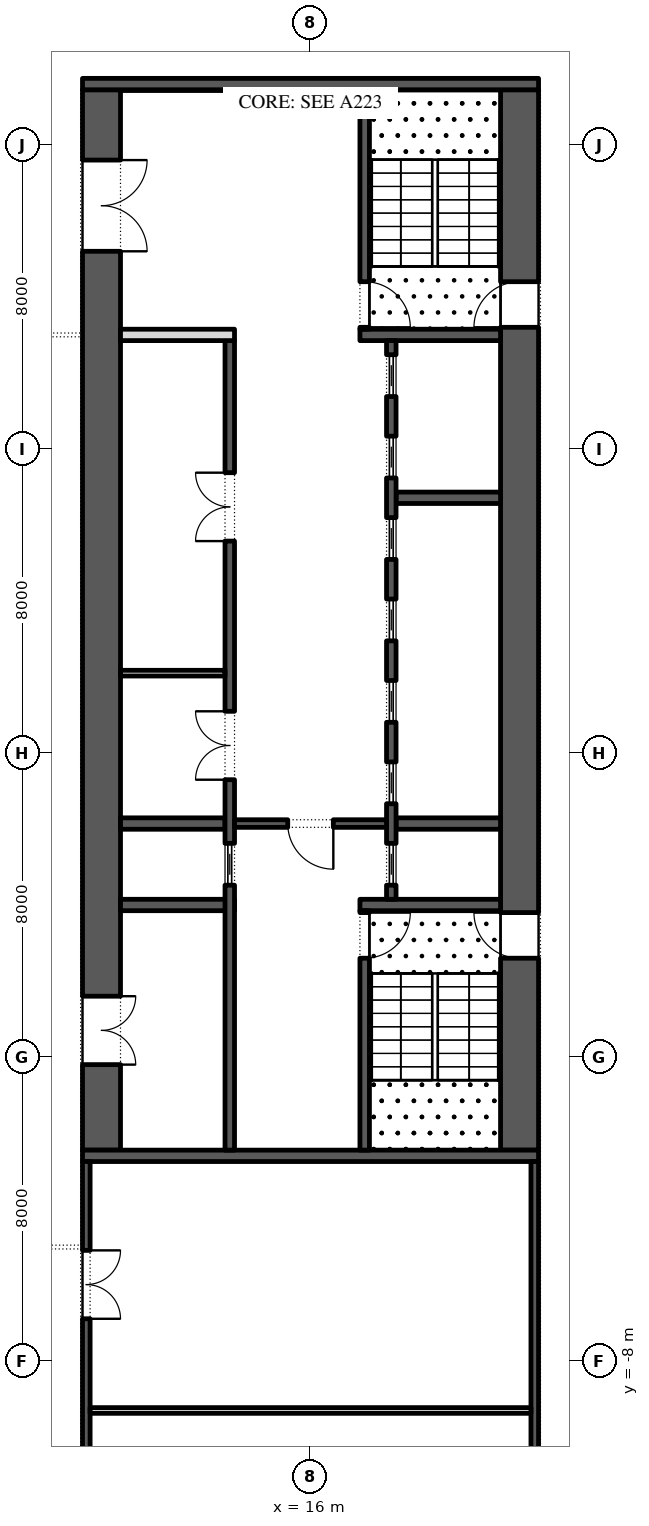
"""IFC4 building model, lengths in metres.
Left out: names, types, materials, properties, quantities, classifications, styles, units other than length and angle.
Written with IfcOpenShell. Run it as: python <this file> out.ifc"""

import sys

from ifc_helpers import new_model, si_unit, direction, frame, frame_2d, origin, place, context, subcontext, project, spatial, rectangle, extrude, element, fill, save


model = new_model("IFC4")
c1 = context("Model", 3, precision=1e-05, world=origin(), true_north=direction((0.0, 1.0)))
c2 = subcontext(c1, "Body", "Model", "MODEL_VIEW")
j1 = project(units=[si_unit("LENGTHUNIT", "METRE"), si_unit("PLANEANGLEUNIT", "RADIAN")], contexts=[c1])
p1 = place(None, origin())
s1 = spatial("IfcSite", under=j1, at=p1, CompositionType="ELEMENT")
p2 = place(p1, origin())
s2 = spatial("IfcBuilding", under=s1, at=p2, CompositionType="ELEMENT")
p3 = place(p2, frame((0.0, 0.0, 94.2)))
s3 = spatial("IfcBuildingStorey", under=s2, at=p3, CompositionType="ELEMENT", Elevation=94.2)
p4 = place(p3, frame((21.5, -2.45, 0.0), z_axis=(0.0, 0.0, 1.0), x_axis=(0.0, 1.0, 0.0)))
e1 = element("IfcWall", 1, at=p4, inside=s3, PredefinedType="SHEAR", context=c2, shape_type="SweptSolid", body=[
    extrude(rectangle(XDim=27.9, YDim=1.0, at=frame_2d((13.95, 0.0))), origin(), (0.0, 0.0, 1.0), 4.95),
])
p5 = place(p4, frame((5.05, 0.0, 0.0)))
e2 = element("IfcOpeningElement", 2, at=p5, cuts=e1, PredefinedType="OPENING", context=c2, shape_type="SweptSolid", body=[
    extrude(rectangle(XDim=1.2, YDim=2.1, at=frame_2d((0.6, 1.05))), frame((0.0, 0.51, 0.0), z_axis=(0.0, -1.0, 0.0), x_axis=(1.0, 0.0, 0.0)), (0.0, 0.0, 1.0), 1.02),
])
p6 = place(p4, frame((21.65, 0.0, 0.0)))
e3 = element("IfcOpeningElement", 3, at=p6, cuts=e1, PredefinedType="OPENING", context=c2, shape_type="SweptSolid", body=[
    extrude(rectangle(XDim=1.2, YDim=2.1, at=frame_2d((0.6, 1.05))), frame((0.0, 0.51, 0.0), z_axis=(0.0, -1.0, 0.0), x_axis=(1.0, 0.0, 0.0)), (0.0, 0.0, 1.0), 1.02),
])
p7 = place(p3, frame((10.5, -2.45, 0.0), z_axis=(0.0, 0.0, 1.0), x_axis=(0.0, 1.0, 0.0)))
e4 = element("IfcWall", 4, at=p7, inside=s3, PredefinedType="SHEAR", context=c2, shape_type="SweptSolid", body=[
    extrude(rectangle(XDim=27.9, YDim=1.0, at=frame_2d((13.95, 0.0))), origin(), (0.0, 0.0, 1.0), 4.95),
])
p8 = place(p7, frame((23.65, 0.0, 0.0)))
e5 = element("IfcOpeningElement", 5, at=p8, cuts=e4, PredefinedType="OPENING", context=c2, shape_type="SweptSolid", body=[
    extrude(rectangle(XDim=2.4, YDim=2.1, at=frame_2d((1.2, 1.05))), frame((0.0, 0.51, 0.0), z_axis=(0.0, -1.0, 0.0), x_axis=(1.0, 0.0, 0.0)), (0.0, 0.0, 1.0), 1.02),
])
p9 = place(p7, frame((2.25, 0.0, 0.0)))
e6 = element("IfcOpeningElement", 6, at=p9, cuts=e4, PredefinedType="OPENING", context=c2, shape_type="SweptSolid", body=[
    extrude(rectangle(XDim=1.8, YDim=2.4, at=frame_2d((0.9, 1.2))), frame((0.0, 0.51, 0.0), z_axis=(0.0, -1.0, 0.0), x_axis=(1.0, 0.0, 0.0)), (0.0, 0.0, 1.0), 1.02),
])
for number, where, z_axis, x_axis in (
    (7, (10.0, -2.6, 0.0), (0.0, 0.0, 1.0), (1.0, 0.0, 0.0)),
    (8, (10.0, 25.6, 0.0), (0.0, 0.0, 1.0), (1.0, 0.0, 0.0)),
):
    element("IfcWall", number, at=place(p3, frame(where, z_axis=z_axis, x_axis=x_axis)), inside=s3, PredefinedType="SHEAR", context=c2, shape_type="SweptSolid", body=[
        extrude(rectangle(XDim=12.0, YDim=0.3, at=frame_2d((6.0, 0.0))), origin(), (0.0, 0.0, 1.0), 4.95),
    ])
p10 = place(p3, frame((17.3, 4.0, 0.0), z_axis=(0.0, 0.0, 1.0), x_axis=(1.0, 0.0, 0.0)))
e9 = element("IfcWall", 9, at=p10, inside=s3, PredefinedType="SHEAR", context=c2, shape_type="SweptSolid", body=[
    extrude(rectangle(XDim=3.7, YDim=0.3, at=frame_2d((1.85, 0.0))), origin(), (0.0, 0.0, 1.0), 4.95),
])
p11 = place(p3, frame((17.425, -2.45, 0.0), z_axis=(0.0, 0.0, 1.0), x_axis=(0.0, 1.0, 0.0)))
e10 = element("IfcWall", 10, at=p11, inside=s3, PredefinedType="SHEAR", context=c2, shape_type="SweptSolid", body=[
    extrude(rectangle(XDim=6.3, YDim=0.25, at=frame_2d((3.15, 0.0))), origin(), (0.0, 0.0, 1.0), 4.95),
])
p12 = place(p11, frame((5.05, 0.0, 0.0)))
e11 = element("IfcOpeningElement", 11, at=p12, cuts=e10, PredefinedType="OPENING", context=c2, shape_type="SweptSolid", body=[
    extrude(rectangle(XDim=1.2, YDim=2.1, at=frame_2d((0.6, 1.05))), frame((0.0, 0.135, 0.0), z_axis=(0.0, -1.0, 0.0), x_axis=(1.0, 0.0, 0.0)), (0.0, 0.0, 1.0), 0.27),
])
p13 = place(p3, frame((17.3, 19.0, 0.0), z_axis=(0.0, 0.0, 1.0), x_axis=(1.0, 0.0, 0.0)))
e12 = element("IfcWall", 12, at=p13, inside=s3, PredefinedType="SHEAR", context=c2, shape_type="SweptSolid", body=[
    extrude(rectangle(XDim=3.7, YDim=0.3, at=frame_2d((1.85, 0.0))), origin(), (0.0, 0.0, 1.0), 4.95),
])
p14 = place(p3, frame((17.425, 19.15, 0.0), z_axis=(0.0, 0.0, 1.0), x_axis=(0.0, 1.0, 0.0)))
e13 = element("IfcWall", 13, at=p14, inside=s3, PredefinedType="SHEAR", context=c2, shape_type="SweptSolid", body=[
    extrude(rectangle(XDim=6.3, YDim=0.25, at=frame_2d((3.15, 0.0))), origin(), (0.0, 0.0, 1.0), 4.95),
])
p15 = place(p14, frame((0.05, 0.0, 0.0)))
e14 = element("IfcOpeningElement", 14, at=p15, cuts=e13, PredefinedType="OPENING", context=c2, shape_type="SweptSolid", body=[
    extrude(rectangle(XDim=1.2, YDim=2.1, at=frame_2d((0.6, 1.05))), frame((0.0, 0.135, 0.0), z_axis=(0.0, -1.0, 0.0), x_axis=(1.0, 0.0, 0.0)), (0.0, 0.0, 1.0), 0.27),
])
for number, where, z_axis, x_axis in (
    (15, (18.25, 6.143, 0.0), (0.0, 0.0, 1.0), (1.0, 0.0, 0.0)),
    (16, (18.25, 14.714, 0.0), (0.0, 0.0, 1.0), (1.0, 0.0, 0.0)),
):
    element("IfcWall", number, at=place(p3, frame(where, z_axis=z_axis, x_axis=x_axis)), inside=s3, PredefinedType="SHEAR", context=c2, shape_type="SweptSolid", body=[
        extrude(rectangle(XDim=2.75, YDim=0.3, at=frame_2d((1.375, 0.0))), origin(), (0.0, 0.0, 1.0), 4.95),
    ])
p16 = place(p3, frame((18.125, 4.15, 0.0), z_axis=(0.0, 0.0, 1.0), x_axis=(0.0, 1.0, 0.0)))
e17 = element("IfcWall", 17, at=p16, inside=s3, PredefinedType="SHEAR", context=c2, shape_type="SweptSolid", body=[
    extrude(rectangle(XDim=14.7, YDim=0.25, at=frame_2d((7.35, 0.0))), origin(), (0.0, 0.0, 1.0), 4.95),
])
p17 = place(p16, frame((0.371, 0.0, 0.0)))
e18 = element("IfcOpeningElement", 18, at=p17, cuts=e17, PredefinedType="OPENING", context=c2, shape_type="SweptSolid", body=[
    extrude(rectangle(XDim=1.1, YDim=2.1, at=frame_2d((0.55, 1.05))), frame((0.0, 0.135, 0.0), z_axis=(0.0, -1.0, 0.0), x_axis=(1.0, 0.0, 0.0)), (0.0, 0.0, 1.0), 0.27),
])
p18 = place(p16, frame((2.514, 0.0, 0.0)))
e19 = element("IfcOpeningElement", 19, at=p18, cuts=e17, PredefinedType="OPENING", context=c2, shape_type="SweptSolid", body=[
    extrude(rectangle(XDim=1.1, YDim=2.1, at=frame_2d((0.55, 1.05))), frame((0.0, 0.135, 0.0), z_axis=(0.0, -1.0, 0.0), x_axis=(1.0, 0.0, 0.0)), (0.0, 0.0, 1.0), 0.27),
])
p19 = place(p16, frame((4.657, 0.0, 0.0)))
e20 = element("IfcOpeningElement", 20, at=p19, cuts=e17, PredefinedType="OPENING", context=c2, shape_type="SweptSolid", body=[
    extrude(rectangle(XDim=1.1, YDim=2.1, at=frame_2d((0.55, 1.05))), frame((0.0, 0.135, 0.0), z_axis=(0.0, -1.0, 0.0), x_axis=(1.0, 0.0, 0.0)), (0.0, 0.0, 1.0), 0.27),
])
p20 = place(p16, frame((6.8, 0.0, 0.0)))
e21 = element("IfcOpeningElement", 21, at=p20, cuts=e17, PredefinedType="OPENING", context=c2, shape_type="SweptSolid", body=[
    extrude(rectangle(XDim=1.1, YDim=2.1, at=frame_2d((0.55, 1.05))), frame((0.0, 0.135, 0.0), z_axis=(0.0, -1.0, 0.0), x_axis=(1.0, 0.0, 0.0)), (0.0, 0.0, 1.0), 0.27),
])
p21 = place(p16, frame((8.943, 0.0, 0.0)))
e22 = element("IfcOpeningElement", 22, at=p21, cuts=e17, PredefinedType="OPENING", context=c2, shape_type="SweptSolid", body=[
    extrude(rectangle(XDim=1.1, YDim=2.1, at=frame_2d((0.55, 1.05))), frame((0.0, 0.135, 0.0), z_axis=(0.0, -1.0, 0.0), x_axis=(1.0, 0.0, 0.0)), (0.0, 0.0, 1.0), 0.27),
])
p22 = place(p16, frame((11.086, 0.0, 0.0)))
e23 = element("IfcOpeningElement", 23, at=p22, cuts=e17, PredefinedType="OPENING", context=c2, shape_type="SweptSolid", body=[
    extrude(rectangle(XDim=1.1, YDim=2.1, at=frame_2d((0.55, 1.05))), frame((0.0, 0.135, 0.0), z_axis=(0.0, -1.0, 0.0), x_axis=(1.0, 0.0, 0.0)), (0.0, 0.0, 1.0), 0.27),
])
p23 = place(p16, frame((13.229, 0.0, 0.0)))
e24 = element("IfcOpeningElement", 24, at=p23, cuts=e17, PredefinedType="OPENING", context=c2, shape_type="SweptSolid", body=[
    extrude(rectangle(XDim=1.1, YDim=2.1, at=frame_2d((0.55, 1.05))), frame((0.0, 0.135, 0.0), z_axis=(0.0, -1.0, 0.0), x_axis=(1.0, 0.0, 0.0)), (0.0, 0.0, 1.0), 0.27),
])
p24 = place(p3, frame((11.0, 4.0, 0.0), z_axis=(0.0, 0.0, 1.0), x_axis=(1.0, 0.0, 0.0)))
e25 = element("IfcWall", 25, at=p24, inside=s3, PredefinedType="SHEAR", context=c2, shape_type="SweptSolid", body=[
    extrude(rectangle(XDim=3.0, YDim=0.3, at=frame_2d((1.5, 0.0))), origin(), (0.0, 0.0, 1.0), 4.95),
])
p25 = place(p3, frame((11.0, 6.143, 0.0), z_axis=(0.0, 0.0, 1.0), x_axis=(1.0, 0.0, 0.0)))
e26 = element("IfcWall", 26, at=p25, inside=s3, PredefinedType="SHEAR", context=c2, shape_type="SweptSolid", body=[
    extrude(rectangle(XDim=2.75, YDim=0.3, at=frame_2d((1.375, 0.0))), origin(), (0.0, 0.0, 1.0), 4.95),
])
p26 = place(p3, frame((13.875, -2.45, 0.0), z_axis=(0.0, 0.0, 1.0), x_axis=(0.0, 1.0, 0.0)))
e27 = element("IfcWall", 27, at=p26, inside=s3, PredefinedType="SHEAR", context=c2, shape_type="SweptSolid", body=[
    extrude(rectangle(XDim=21.3, YDim=0.25, at=frame_2d((10.65, 0.0))), origin(), (0.0, 0.0, 1.0), 4.95),
])
p27 = place(p26, frame((9.746, 0.0, 0.0)))
e28 = element("IfcOpeningElement", 28, at=p27, cuts=e27, PredefinedType="OPENING", context=c2, shape_type="SweptSolid", body=[
    extrude(rectangle(XDim=1.8, YDim=2.4, at=frame_2d((0.9, 1.2))), frame((0.0, 0.135, 0.0), z_axis=(0.0, -1.0, 0.0), x_axis=(1.0, 0.0, 0.0)), (0.0, 0.0, 1.0), 0.27),
])
p28 = place(p26, frame((16.025, 0.0, 0.0)))
e29 = element("IfcOpeningElement", 29, at=p28, cuts=e27, PredefinedType="OPENING", context=c2, shape_type="SweptSolid", body=[
    extrude(rectangle(XDim=1.8, YDim=2.4, at=frame_2d((0.9, 1.2))), frame((0.0, 0.135, 0.0), z_axis=(0.0, -1.0, 0.0), x_axis=(1.0, 0.0, 0.0)), (0.0, 0.0, 1.0), 0.27),
])
p29 = place(p26, frame((6.971, 0.0, 0.0)))
e30 = element("IfcOpeningElement", 30, at=p29, cuts=e27, PredefinedType="OPENING", context=c2, shape_type="SweptSolid", body=[
    extrude(rectangle(XDim=1.1, YDim=2.1, at=frame_2d((0.55, 1.05))), frame((0.0, 0.135, 0.0), z_axis=(0.0, -1.0, 0.0), x_axis=(1.0, 0.0, 0.0)), (0.0, 0.0, 1.0), 0.27),
])
p30 = place(p3, frame((11.0, 19.0, 0.0), z_axis=(0.0, 0.0, 1.0), x_axis=(1.0, 0.0, 0.0)))
e31 = element("IfcWall", 31, at=p30, inside=s3, PredefinedType="PARTITIONING", context=c2, shape_type="SweptSolid", body=[
    extrude(rectangle(XDim=3.0, YDim=0.3, at=frame_2d((1.5, 0.0))), origin(), (0.0, 0.0, 1.0), 4.95),
])
p31 = place(p3, frame((11.0, 10.1, 0.0), z_axis=(0.0, 0.0, 1.0), x_axis=(1.0, 0.0, 0.0)))
e32 = element("IfcWall", 32, at=p31, inside=s3, PredefinedType="PARTITIONING", context=c2, shape_type="SweptSolid", body=[
    extrude(rectangle(XDim=2.75, YDim=0.15, at=frame_2d((1.375, 0.0))), origin(), (0.0, 0.0, 1.0), 4.95),
])
p32 = place(p3, frame((14.0, 6.143, 0.0), z_axis=(0.0, 0.0, 1.0), x_axis=(1.0, 0.0, 0.0)))
e33 = element("IfcWall", 33, at=p32, inside=s3, PredefinedType="SHEAR", context=c2, shape_type="SweptSolid", body=[
    extrude(rectangle(XDim=4.0, YDim=0.2, at=frame_2d((2.0, 0.0))), origin(), (0.0, 0.0, 1.0), 4.95),
])
p33 = place(p32, frame((1.4, 0.0, 0.0)))
e34 = element("IfcOpeningElement", 34, at=p33, cuts=e33, PredefinedType="OPENING", context=c2, shape_type="SweptSolid", body=[
    extrude(rectangle(XDim=1.2, YDim=2.1, at=frame_2d((0.6, 1.05))), frame((0.0, 0.11, 0.0), z_axis=(0.0, -1.0, 0.0), x_axis=(1.0, 0.0, 0.0)), (0.0, 0.0, 1.0), 0.22),
])
p34 = place(p3, frame((21.9, -15.8, 0.0), z_axis=(0.0, 0.0, 1.0), x_axis=(0.0, 1.0, 0.0)))
e35 = element("IfcWall", 35, at=p34, inside=s3, PredefinedType="SHEAR", context=c2, shape_type="SweptSolid", body=[
    extrude(rectangle(XDim=13.05, YDim=0.2, at=frame_2d((6.525, 0.0))), origin(), (0.0, 0.0, 1.0), 4.95),
])
p35 = place(p3, frame((10.1, -15.8, 0.0), z_axis=(0.0, 0.0, 1.0), x_axis=(0.0, 1.0, 0.0)))
e36 = element("IfcWall", 36, at=p35, inside=s3, PredefinedType="SHEAR", context=c2, shape_type="SweptSolid", body=[
    extrude(rectangle(XDim=13.05, YDim=0.2, at=frame_2d((6.525, 0.0))), origin(), (0.0, 0.0, 1.0), 4.95),
])
p36 = place(p35, frame((2.312, 0.0, 0.0)))
e37 = element("IfcOpeningElement", 37, at=p36, cuts=e36, PredefinedType="OPENING", context=c2, shape_type="SweptSolid", body=[
    extrude(rectangle(XDim=1.8, YDim=2.4, at=frame_2d((0.9, 1.2))), frame((0.0, 0.11, 0.0), z_axis=(0.0, -1.0, 0.0), x_axis=(1.0, 0.0, 0.0)), (0.0, 0.0, 1.0), 0.22),
])
p37 = place(p35, frame((8.913, 0.0, 0.0)))
e38 = element("IfcOpeningElement", 38, at=p37, cuts=e36, PredefinedType="OPENING", context=c2, shape_type="SweptSolid", body=[
    extrude(rectangle(XDim=1.8, YDim=2.4, at=frame_2d((0.9, 1.2))), frame((0.0, 0.11, 0.0), z_axis=(0.0, -1.0, 0.0), x_axis=(1.0, 0.0, 0.0)), (0.0, 0.0, 1.0), 0.22),
])
p38 = place(p3, frame((10.2, -9.3, 0.0), z_axis=(0.0, 0.0, 1.0), x_axis=(1.0, 0.0, 0.0)))
e39 = element("IfcWall", 39, at=p38, inside=s3, PredefinedType="PARTITIONING", context=c2, shape_type="SweptSolid", body=[
    extrude(rectangle(XDim=11.6, YDim=0.15, at=frame_2d((5.8, 0.0))), origin(), (0.0, 0.0, 1.0), 4.95),
])
p39 = place(p17, origin())
e40 = element("IfcDoor", 40, at=p39, inside=s3, OperationType="SLIDING_TO_LEFT", PredefinedType="DOOR", context=c2, shape_type="SweptSolid", body=[
    extrude(rectangle(XDim=1.1, YDim=2.1, at=frame_2d((0.55, 1.05))), frame((0.0, 0.025, 0.0), z_axis=(0.0, -1.0, 0.0), x_axis=(1.0, 0.0, 0.0)), (0.0, 0.0, 1.0), 0.05),
])
fill(e18, e40)
p40 = place(p18, origin())
e41 = element("IfcDoor", 41, at=p40, inside=s3, OperationType="SLIDING_TO_LEFT", PredefinedType="DOOR", context=c2, shape_type="SweptSolid", body=[
    extrude(rectangle(XDim=1.1, YDim=2.1, at=frame_2d((0.55, 1.05))), frame((0.0, 0.025, 0.0), z_axis=(0.0, -1.0, 0.0), x_axis=(1.0, 0.0, 0.0)), (0.0, 0.0, 1.0), 0.05),
])
fill(e19, e41)
p41 = place(p19, origin())
e42 = element("IfcDoor", 42, at=p41, inside=s3, OperationType="SLIDING_TO_LEFT", PredefinedType="DOOR", context=c2, shape_type="SweptSolid", body=[
    extrude(rectangle(XDim=1.1, YDim=2.1, at=frame_2d((0.55, 1.05))), frame((0.0, 0.025, 0.0), z_axis=(0.0, -1.0, 0.0), x_axis=(1.0, 0.0, 0.0)), (0.0, 0.0, 1.0), 0.05),
])
fill(e20, e42)
p42 = place(p20, origin())
e43 = element("IfcDoor", 43, at=p42, inside=s3, OperationType="SLIDING_TO_LEFT", PredefinedType="DOOR", context=c2, shape_type="SweptSolid", body=[
    extrude(rectangle(XDim=1.1, YDim=2.1, at=frame_2d((0.55, 1.05))), frame((0.0, 0.025, 0.0), z_axis=(0.0, -1.0, 0.0), x_axis=(1.0, 0.0, 0.0)), (0.0, 0.0, 1.0), 0.05),
])
fill(e21, e43)
p43 = place(p21, origin())
e44 = element("IfcDoor", 44, at=p43, inside=s3, OperationType="SLIDING_TO_LEFT", PredefinedType="DOOR", context=c2, shape_type="SweptSolid", body=[
    extrude(rectangle(XDim=1.1, YDim=2.1, at=frame_2d((0.55, 1.05))), frame((0.0, 0.025, 0.0), z_axis=(0.0, -1.0, 0.0), x_axis=(1.0, 0.0, 0.0)), (0.0, 0.0, 1.0), 0.05),
])
fill(e22, e44)
p44 = place(p22, origin())
e45 = element("IfcDoor", 45, at=p44, inside=s3, OperationType="SLIDING_TO_LEFT", PredefinedType="DOOR", context=c2, shape_type="SweptSolid", body=[
    extrude(rectangle(XDim=1.1, YDim=2.1, at=frame_2d((0.55, 1.05))), frame((0.0, 0.025, 0.0), z_axis=(0.0, -1.0, 0.0), x_axis=(1.0, 0.0, 0.0)), (0.0, 0.0, 1.0), 0.05),
])
fill(e23, e45)
p45 = place(p23, origin())
e46 = element("IfcDoor", 46, at=p45, inside=s3, OperationType="SLIDING_TO_LEFT", PredefinedType="DOOR", context=c2, shape_type="SweptSolid", body=[
    extrude(rectangle(XDim=1.1, YDim=2.1, at=frame_2d((0.55, 1.05))), frame((0.0, 0.025, 0.0), z_axis=(0.0, -1.0, 0.0), x_axis=(1.0, 0.0, 0.0)), (0.0, 0.0, 1.0), 0.05),
])
fill(e24, e46)
p46 = place(p27, origin())
e47 = element("IfcDoor", 47, at=p46, inside=s3, OperationType="DOUBLE_DOOR_SINGLE_SWING", PredefinedType="DOOR", context=c2, shape_type="SweptSolid", body=[
    extrude(rectangle(XDim=1.8, YDim=2.4, at=frame_2d((0.9, 1.2))), frame((0.0, 0.125, 0.0), z_axis=(0.0, -1.0, 0.0), x_axis=(1.0, 0.0, 0.0)), (0.0, 0.0, 1.0), 0.05),
])
fill(e28, e47)
p47 = place(p28, origin())
e48 = element("IfcDoor", 48, at=p47, inside=s3, OperationType="DOUBLE_DOOR_SINGLE_SWING", PredefinedType="DOOR", context=c2, shape_type="SweptSolid", body=[
    extrude(rectangle(XDim=1.8, YDim=2.4, at=frame_2d((0.9, 1.2))), frame((0.0, 0.125, 0.0), z_axis=(0.0, -1.0, 0.0), x_axis=(1.0, 0.0, 0.0)), (0.0, 0.0, 1.0), 0.05),
])
fill(e29, e48)
p48 = place(p29, origin())
e49 = element("IfcDoor", 49, at=p48, inside=s3, OperationType="SLIDING_TO_LEFT", PredefinedType="DOOR", context=c2, shape_type="SweptSolid", body=[
    extrude(rectangle(XDim=1.1, YDim=2.1, at=frame_2d((0.55, 1.05))), frame((0.0, 0.025, 0.0), z_axis=(0.0, -1.0, 0.0), x_axis=(1.0, 0.0, 0.0)), (0.0, 0.0, 1.0), 0.05),
])
fill(e30, e49)
p49 = place(p33, frame((1.2, 0.0, 0.0), z_axis=(0.0, 0.0, 1.0), x_axis=(-1.0, 0.0, 0.0)))
e50 = element("IfcDoor", 50, at=p49, inside=s3, OperationType="SINGLE_SWING_RIGHT", PredefinedType="DOOR", context=c2, shape_type="SweptSolid", body=[
    extrude(rectangle(XDim=1.2, YDim=2.1, at=frame_2d((0.6, 1.05))), frame((0.0, 0.025, 0.0), z_axis=(0.0, -1.0, 0.0), x_axis=(1.0, 0.0, 0.0)), (0.0, 0.0, 1.0), 0.05),
])
fill(e34, e50)
p50 = place(p8, frame((2.4, 0.0, 0.0), z_axis=(0.0, 0.0, 1.0), x_axis=(-1.0, 0.0, 0.0)))
e51 = element("IfcDoor", 51, at=p50, inside=s3, OperationType="DOUBLE_DOOR_SINGLE_SWING", PredefinedType="DOOR", context=c2, shape_type="SweptSolid", body=[
    extrude(rectangle(XDim=2.4, YDim=2.1, at=frame_2d((1.2, 1.05))), frame((0.0, 0.025, 0.0), z_axis=(0.0, -1.0, 0.0), x_axis=(1.0, 0.0, 0.0)), (0.0, 0.0, 1.0), 0.05),
])
fill(e5, e51)
p51 = place(p12, frame((1.2, 0.0, 0.0), z_axis=(0.0, 0.0, 1.0), x_axis=(-1.0, 0.0, 0.0)))
e52 = element("IfcDoor", 52, at=p51, inside=s3, OperationType="SINGLE_SWING_RIGHT", PredefinedType="DOOR", context=c2, shape_type="SweptSolid", body=[
    extrude(rectangle(XDim=1.2, YDim=2.1, at=frame_2d((0.6, 1.05))), frame((0.0, 0.025, 0.0), z_axis=(0.0, -1.0, 0.0), x_axis=(1.0, 0.0, 0.0)), (0.0, 0.0, 1.0), 0.05),
])
fill(e11, e52)
p52 = place(p5, origin())
e53 = element("IfcDoor", 53, at=p52, inside=s3, OperationType="SINGLE_SWING_LEFT", PredefinedType="DOOR", context=c2, shape_type="SweptSolid", body=[
    extrude(rectangle(XDim=1.2, YDim=2.1, at=frame_2d((0.6, 1.05))), frame((0.0, 0.025, 0.0), z_axis=(0.0, -1.0, 0.0), x_axis=(1.0, 0.0, 0.0)), (0.0, 0.0, 1.0), 0.05),
])
fill(e2, e53)
p53 = place(p15, frame((1.2, 0.0, 0.0), z_axis=(0.0, 0.0, 1.0), x_axis=(-1.0, 0.0, 0.0)))
e54 = element("IfcDoor", 54, at=p53, inside=s3, OperationType="SINGLE_SWING_LEFT", PredefinedType="DOOR", context=c2, shape_type="SweptSolid", body=[
    extrude(rectangle(XDim=1.2, YDim=2.1, at=frame_2d((0.6, 1.05))), frame((0.0, 0.025, 0.0), z_axis=(0.0, -1.0, 0.0), x_axis=(1.0, 0.0, 0.0)), (0.0, 0.0, 1.0), 0.05),
])
fill(e14, e54)
p54 = place(p6, origin())
e55 = element("IfcDoor", 55, at=p54, inside=s3, OperationType="SINGLE_SWING_RIGHT", PredefinedType="DOOR", context=c2, shape_type="SweptSolid", body=[
    extrude(rectangle(XDim=1.2, YDim=2.1, at=frame_2d((0.6, 1.05))), frame((0.0, 0.025, 0.0), z_axis=(0.0, -1.0, 0.0), x_axis=(1.0, 0.0, 0.0)), (0.0, 0.0, 1.0), 0.05),
])
fill(e3, e55)
p55 = place(p9, frame((1.8, -0.95, 0.0), z_axis=(0.0, 0.0, 1.0), x_axis=(-1.0, 0.0, 0.0)))
e56 = element("IfcDoor", 56, at=p55, inside=s3, OperationType="DOUBLE_DOOR_SINGLE_SWING", PredefinedType="DOOR", context=c2, shape_type="SweptSolid", body=[
    extrude(rectangle(XDim=1.8, YDim=2.4, at=frame_2d((0.9, 1.2))), frame((0.0, -0.45, 0.0), z_axis=(0.0, -1.0, 0.0), x_axis=(1.0, 0.0, 0.0)), (0.0, 0.0, 1.0), 0.05),
])
fill(e6, e56)
p56 = place(p37, frame((1.8, -0.15, 0.0), z_axis=(0.0, 0.0, 1.0), x_axis=(-1.0, 0.0, 0.0)))
e57 = element("IfcDoor", 57, at=p56, inside=s3, OperationType="DOUBLE_DOOR_SINGLE_SWING", PredefinedType="DOOR", context=c2, shape_type="SweptSolid", body=[
    extrude(rectangle(XDim=1.8, YDim=2.4, at=frame_2d((0.9, 1.2))), frame((0.0, -0.05, 0.0), z_axis=(0.0, -1.0, 0.0), x_axis=(1.0, 0.0, 0.0)), (0.0, 0.0, 1.0), 0.05),
])
fill(e38, e57)
save(model, sys.argv[1])
